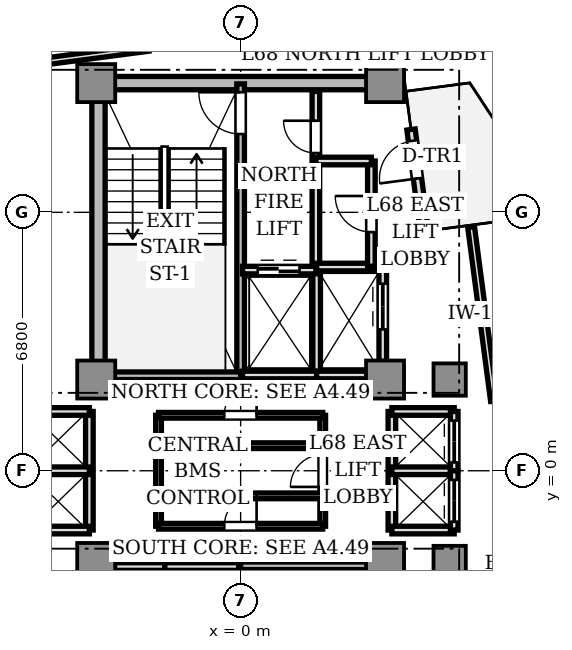
"""IFC4 building model, lengths in metres.
Left out: names, types, materials, properties, quantities, classifications, styles, units other than length and angle.
Written with IfcOpenShell. Run it as: python <this file> out.ifc"""

import sys

from ifc_helpers import new_model, si_unit, direction, frame, frame_2d, origin, origin_2d, place, context, subcontext, project, spatial, rectangle, extrude, source, transform, mapped, element, fill, save


model = new_model("IFC4")
c1 = context("Model", 3, precision=1e-05, world=origin(), true_north=direction((0.0, 1.0)))
c2 = subcontext(c1, "Body", "Model", "MODEL_VIEW")
j1 = project(units=[si_unit("LENGTHUNIT", "METRE"), si_unit("PLANEANGLEUNIT", "RADIAN")], contexts=[c1])
p1 = place(None, origin())
s1 = spatial("IfcSite", under=j1, at=p1, CompositionType="ELEMENT")
p2 = place(p1, origin())
s2 = spatial("IfcBuilding", under=s1, at=p2, CompositionType="ELEMENT")
p3 = place(p2, frame((0.0, 0.0, 244.5)))
s3 = spatial("IfcBuildingStorey", under=s2, at=p3, CompositionType="ELEMENT", Elevation=244.5)
p4 = place(p3, frame((-3.55, 10.2, 0.0), z_axis=(0.0, 0.0, 1.0), x_axis=(1.0, 0.0, 0.0)))
e1 = element("IfcWall", 1, at=p4, inside=s3, PredefinedType="SHEAR", context=c2, shape_type="SweptSolid", body=[
    extrude(rectangle(XDim=7.1, YDim=0.35, at=frame_2d((3.55, 0.0))), origin(), (0.0, 0.0, 1.0), 3.11),
])
p5 = place(p3, frame((-3.74, 2.85, 0.0), z_axis=(0.0, 0.0, 1.0), x_axis=(0.0, 1.0, 0.0)))
e2 = element("IfcWall", 2, at=p5, inside=s3, PredefinedType="SHEAR", context=c2, shape_type="SweptSolid", body=[
    extrude(rectangle(XDim=6.9, YDim=0.35, at=frame_2d((3.45, 0.0))), origin(), (0.0, 0.0, 1.0), 3.11),
])
m1 = source(origin(), c2, "Body", "SweptSolid", [
    extrude(rectangle(XDim=1.0, YDim=1.0, at=origin_2d()), origin(), (0.0, 0.0, 1.0), 3.11),
])
for number, where, z_axis, x_axis in (
    (3, (-3.8, 2.4, 0.0), (0.0, 0.0, 1.0), (1.0, 0.0, 0.0)),
    (4, (3.8, 2.4, 0.0), (0.0, 0.0, 1.0), (1.0, 0.0, 0.0)),
    (5, (-3.8, 10.2, 0.0), (0.0, 0.0, 1.0), (1.0, 0.0, 0.0)),
    (6, (3.8, 10.2, 0.0), (0.0, 0.0, 1.0), (1.0, 0.0, 0.0)),
    (7, (-3.8, -2.4, 0.0), (0.0, 0.0, 1.0), (1.0, 0.0, 0.0)),
    (8, (3.8, -2.4, 0.0), (0.0, 0.0, 1.0), (1.0, 0.0, 0.0)),
):
    element("IfcColumn", number, at=place(p3, frame(where, z_axis=z_axis, x_axis=x_axis)), inside=s3, PredefinedType="COLUMN", context=c2, shape_type="MappedRepresentation", body=[
        mapped(m1, transform((0.0, 0.0, 0.0), scale=1.0)),
    ])
m2 = source(origin(), c2, "Body", "SweptSolid", [
    extrude(rectangle(XDim=0.85, YDim=0.85, at=origin_2d()), origin(), (0.0, 0.0, 1.0), 3.11),
])
for number, where, z_axis, x_axis in (
    (9, (5.5, 2.4, 0.0), (0.0, 0.0, 1.0), (1.0, 0.0, 0.0)),
    (10, (5.5, -2.4, 0.0), (0.0, 0.0, 1.0), (1.0, 0.0, 0.0)),
):
    element("IfcColumn", number, at=place(p3, frame(where, z_axis=z_axis, x_axis=x_axis)), inside=s3, PredefinedType="COLUMN", context=c2, shape_type="MappedRepresentation", body=[
        mapped(m2, transform((0.0, 0.0, 0.0), scale=1.0)),
    ])
p6 = place(p3, frame((4.836, 6.302, 0.0), z_axis=(0.0, 0.0, 1.0), x_axis=(-0.130475563272, 0.991451525486, 0.0)))
e11 = element("IfcWall", 11, at=p6, inside=s3, PredefinedType="STANDARD", context=c2, shape_type="SweptSolid", body=[
    extrude(rectangle(XDim=2.7, YDim=0.22, at=frame_2d((1.35, 0.0))), origin(), (0.0, 0.0, 1.0), 3.11),
])
p7 = place(p6, frame((1.4, 0.0, 0.0)))
e12 = element("IfcOpeningElement", 12, at=p7, cuts=e11, PredefinedType="OPENING", context=c2, shape_type="SweptSolid", body=[
    extrude(rectangle(XDim=1.0, YDim=2.2, at=frame_2d((0.5, 1.1))), frame((0.0, 0.12, 0.0), z_axis=(0.0, -1.0, 0.0), x_axis=(1.0, 0.0, 0.0)), (0.0, 0.0, 1.0), 0.24),
])
p8 = place(p3, frame((0.0, 2.5, 0.0), z_axis=(0.0, 0.0, 1.0), x_axis=(0.0, 1.0, 0.0)))
e13 = element("IfcWall", 13, at=p8, inside=s3, PredefinedType="SOLIDWALL", context=c2, shape_type="SweptSolid", body=[
    extrude(rectangle(XDim=7.68, YDim=0.2, at=frame_2d((3.84, 0.0))), origin(), (0.0, 0.0, 1.0), 3.11),
])
p9 = place(p8, frame((6.36, 0.0, 0.0)))
e14 = element("IfcOpeningElement", 14, at=p9, cuts=e13, PredefinedType="OPENING", context=c2, shape_type="SweptSolid", body=[
    extrude(rectangle(XDim=1.1, YDim=2.15, at=frame_2d((0.55, 1.075))), frame((0.0, 0.11, 0.0), z_axis=(0.0, -1.0, 0.0), x_axis=(1.0, 0.0, 0.0)), (0.0, 0.0, 1.0), 0.22),
])
p10 = place(p3, frame((-3.72, 2.5, 0.0), z_axis=(0.0, 0.0, 1.0), x_axis=(1.0, 0.0, 0.0)))
e15 = element("IfcWall", 15, at=p10, inside=s3, PredefinedType="SOLIDWALL", context=c2, shape_type="SweptSolid", body=[
    extrude(rectangle(XDim=3.72, YDim=0.2, at=frame_2d((1.86, 0.0))), origin(), (0.0, 0.0, 1.0), 3.11),
])
p11 = place(p3, frame((0.0, -10.18, 0.0), z_axis=(0.0, 0.0, 1.0), x_axis=(0.0, 1.0, 0.0)))
e16 = element("IfcWall", 16, at=p11, inside=s3, PredefinedType="SOLIDWALL", context=c2, shape_type="SweptSolid", body=[
    extrude(rectangle(XDim=7.68, YDim=0.2, at=frame_2d((3.84, 0.0))), origin(), (0.0, 0.0, 1.0), 3.11),
])
p12 = place(p11, frame((0.28, 0.0, 0.0)))
e17 = element("IfcOpeningElement", 17, at=p12, cuts=e16, PredefinedType="OPENING", context=c2, shape_type="SweptSolid", body=[
    extrude(rectangle(XDim=1.1, YDim=2.15, at=frame_2d((0.55, 1.075))), frame((0.0, 0.11, 0.0), z_axis=(0.0, -1.0, 0.0), x_axis=(1.0, 0.0, 0.0)), (0.0, 0.0, 1.0), 0.22),
])
p13 = place(p3, frame((0.0, -2.5, 0.0), z_axis=(0.0, 0.0, 1.0), x_axis=(1.0, 0.0, 0.0)))
e18 = element("IfcWall", 18, at=p13, inside=s3, PredefinedType="SOLIDWALL", context=c2, shape_type="SweptSolid", body=[
    extrude(rectangle(XDim=3.72, YDim=0.2, at=frame_2d((1.86, 0.0))), origin(), (0.0, 0.0, 1.0), 3.11),
])
p14 = place(p3, frame((1.98, 5.32, 0.0), z_axis=(0.0, 0.0, 1.0), x_axis=(0.0, 1.0, 0.0)))
e19 = element("IfcWall", 19, at=p14, inside=s3, PredefinedType="SOLIDWALL", context=c2, shape_type="SweptSolid", body=[
    extrude(rectangle(XDim=4.66, YDim=0.2, at=frame_2d((2.33, 0.0))), origin(), (0.0, 0.0, 1.0), 2.66),
])
p15 = place(p14, frame((3.04, 0.0, 0.0)))
e20 = element("IfcOpeningElement", 20, at=p15, cuts=e19, PredefinedType="OPENING", context=c2, shape_type="SweptSolid", body=[
    extrude(rectangle(XDim=0.85, YDim=2.1, at=frame_2d((0.425, 1.05))), frame((0.0, 0.11, 0.0), z_axis=(0.0, -1.0, 0.0), x_axis=(1.0, 0.0, 0.0)), (0.0, 0.0, 1.0), 0.22),
])
p16 = place(p3, frame((2.0, 2.5, 0.0), z_axis=(0.0, 0.0, 1.0), x_axis=(0.0, 1.0, 0.0)))
e21 = element("IfcWall", 21, at=p16, inside=s3, PredefinedType="SOLIDWALL", context=c2, shape_type="SweptSolid", body=[
    extrude(rectangle(XDim=2.78, YDim=0.2, at=frame_2d((1.39, 0.0))), origin(), (0.0, 0.0, 1.0), 2.66),
])
p17 = place(p3, frame((0.05, 2.52, 0.0), z_axis=(0.0, 0.0, 1.0), x_axis=(1.0, 0.0, 0.0)))
e22 = element("IfcWall", 22, at=p17, inside=s3, PredefinedType="SOLIDWALL", context=c2, shape_type="SweptSolid", body=[
    extrude(rectangle(XDim=1.95, YDim=0.2, at=frame_2d((0.975, 0.0))), origin(), (0.0, 0.0, 1.0), 2.66),
])
p18 = place(p3, frame((0.05, 5.28, 0.0), z_axis=(0.0, 0.0, 1.0), x_axis=(1.0, 0.0, 0.0)))
e23 = element("IfcWall", 23, at=p18, inside=s3, PredefinedType="SOLIDWALL", context=c2, shape_type="SweptSolid", body=[
    extrude(rectangle(XDim=1.93, YDim=0.2, at=frame_2d((0.965, 0.0))), origin(), (0.0, 0.0, 1.0), 2.66),
])
p19 = place(p18, frame((0.4, 0.0, 0.0)))
e24 = element("IfcOpeningElement", 24, at=p19, cuts=e23, PredefinedType="OPENING", context=c2, shape_type="SweptSolid", body=[
    extrude(rectangle(XDim=1.1, YDim=2.2, at=frame_2d((0.55, 1.1))), frame((0.0, 0.11, 0.0), z_axis=(0.0, -1.0, 0.0), x_axis=(1.0, 0.0, 0.0)), (0.0, 0.0, 1.0), 0.22),
])
p20 = place(p3, frame((-2.0, -5.28, 0.0), z_axis=(0.0, 0.0, 1.0), x_axis=(0.0, 1.0, 0.0)))
e25 = element("IfcWall", 25, at=p20, inside=s3, PredefinedType="SOLIDWALL", context=c2, shape_type="SweptSolid", body=[
    extrude(rectangle(XDim=2.78, YDim=0.2, at=frame_2d((1.39, 0.0))), origin(), (0.0, 0.0, 1.0), 2.66),
])
p21 = place(p3, frame((-2.0, -2.52, 0.0), z_axis=(0.0, 0.0, 1.0), x_axis=(1.0, 0.0, 0.0)))
e26 = element("IfcWall", 26, at=p21, inside=s3, PredefinedType="SOLIDWALL", context=c2, shape_type="SweptSolid", body=[
    extrude(rectangle(XDim=1.95, YDim=0.2, at=frame_2d((0.975, 0.0))), origin(), (0.0, 0.0, 1.0), 2.66),
])
p22 = place(p3, frame((2.0, 2.52, 0.0), z_axis=(0.0, 0.0, 1.0), x_axis=(1.0, 0.0, 0.0)))
e27 = element("IfcWall", 27, at=p22, inside=s3, PredefinedType="SOLIDWALL", context=c2, shape_type="SweptSolid", body=[
    extrude(rectangle(XDim=1.32, YDim=0.2, at=frame_2d((0.66, 0.0))), origin(), (0.0, 0.0, 1.0), 2.66),
])
p23 = place(p3, frame((2.0, 5.36, 0.0), z_axis=(0.0, 0.0, 1.0), x_axis=(1.0, 0.0, 0.0)))
e28 = element("IfcWall", 28, at=p23, inside=s3, PredefinedType="SOLIDWALL", context=c2, shape_type="SweptSolid", body=[
    extrude(rectangle(XDim=1.74, YDim=0.2, at=frame_2d((0.87, 0.0))), origin(), (0.0, 0.0, 1.0), 2.66),
])
p24 = place(p3, frame((3.74, 2.88, 0.0), z_axis=(0.0, 0.0, 1.0), x_axis=(0.0, 1.0, 0.0)))
e29 = element("IfcWall", 29, at=p24, inside=s3, PredefinedType="SOLIDWALL", context=c2, shape_type="SweptSolid", body=[
    extrude(rectangle(XDim=2.48, YDim=0.2, at=frame_2d((1.24, 0.0))), origin(), (0.0, 0.0, 1.0), 2.66),
])
p25 = place(p24, frame((0.84, 0.0, 0.0)))
e30 = element("IfcOpeningElement", 30, at=p25, cuts=e29, PredefinedType="OPENING", context=c2, shape_type="SweptSolid", body=[
    extrude(rectangle(XDim=1.2, YDim=2.2, at=frame_2d((0.6, 1.1))), frame((0.0, 0.11, 0.0), z_axis=(0.0, -1.0, 0.0), x_axis=(1.0, 0.0, 0.0)), (0.0, 0.0, 1.0), 0.22),
])
p26 = place(p3, frame((-3.32, -2.52, 0.0), z_axis=(0.0, 0.0, 1.0), x_axis=(1.0, 0.0, 0.0)))
e31 = element("IfcWall", 31, at=p26, inside=s3, PredefinedType="SOLIDWALL", context=c2, shape_type="SweptSolid", body=[
    extrude(rectangle(XDim=1.32, YDim=0.2, at=frame_2d((0.66, 0.0))), origin(), (0.0, 0.0, 1.0), 2.66),
])
p27 = place(p3, frame((3.98, -1.56, 0.0), z_axis=(0.0, 0.0, 1.0), x_axis=(0.0, 1.0, 0.0)))
e32 = element("IfcWall", 32, at=p27, inside=s3, PredefinedType="SOLIDWALL", context=c2, shape_type="SweptSolid", body=[
    extrude(rectangle(XDim=3.12, YDim=0.2, at=frame_2d((1.56, 0.0))), origin(), (0.0, 0.0, 1.0), 2.33),
])
for number, where, z_axis, x_axis in (
    (33, (3.98, 1.56, 0.0), (0.0, 0.0, 1.0), (1.0, 0.0, 0.0)),
    (34, (3.98, -1.56, 0.0), (0.0, 0.0, 1.0), (1.0, 0.0, 0.0)),
    (35, (3.98, 0.0, 0.0), (0.0, 0.0, 1.0), (1.0, 0.0, 0.0)),
):
    element("IfcWall", number, at=place(p3, frame(where, z_axis=z_axis, x_axis=x_axis)), inside=s3, PredefinedType="SOLIDWALL", context=c2, shape_type="SweptSolid", body=[
        extrude(rectangle(XDim=1.64, YDim=0.2, at=frame_2d((0.82, 0.0))), origin(), (0.0, 0.0, 1.0), 2.66),
    ])
p28 = place(p3, frame((5.62, 0.0, 0.0), z_axis=(0.0, 0.0, 1.0), x_axis=(0.0, 1.0, 0.0)))
e36 = element("IfcWall", 36, at=p28, inside=s3, PredefinedType="SOLIDWALL", context=c2, shape_type="SweptSolid", body=[
    extrude(rectangle(XDim=1.56, YDim=0.2, at=frame_2d((0.78, 0.0))), origin(), (0.0, 0.0, 1.0), 2.66),
])
p29 = place(p28, frame((0.22, 0.0, 0.0)))
e37 = element("IfcOpeningElement", 37, at=p29, cuts=e36, PredefinedType="OPENING", context=c2, shape_type="SweptSolid", body=[
    extrude(rectangle(XDim=1.1, YDim=2.2, at=frame_2d((0.55, 1.1))), frame((0.0, 0.11, 0.0), z_axis=(0.0, -1.0, 0.0), x_axis=(1.0, 0.0, 0.0)), (0.0, 0.0, 1.0), 0.22),
])
p30 = place(p3, frame((5.62, -1.56, 0.0), z_axis=(0.0, 0.0, 1.0), x_axis=(0.0, 1.0, 0.0)))
e38 = element("IfcWall", 38, at=p30, inside=s3, PredefinedType="SOLIDWALL", context=c2, shape_type="SweptSolid", body=[
    extrude(rectangle(XDim=1.56, YDim=0.2, at=frame_2d((0.78, 0.0))), origin(), (0.0, 0.0, 1.0), 2.66),
])
p31 = place(p30, frame((0.22, 0.0, 0.0)))
e39 = element("IfcOpeningElement", 39, at=p31, cuts=e38, PredefinedType="OPENING", context=c2, shape_type="SweptSolid", body=[
    extrude(rectangle(XDim=1.1, YDim=2.2, at=frame_2d((0.55, 1.1))), frame((0.0, 0.11, 0.0), z_axis=(0.0, -1.0, 0.0), x_axis=(1.0, 0.0, 0.0)), (0.0, 0.0, 1.0), 0.22),
])
p32 = place(p3, frame((-3.98, -1.56, 0.0), z_axis=(0.0, 0.0, 1.0), x_axis=(0.0, 1.0, 0.0)))
e40 = element("IfcWall", 40, at=p32, inside=s3, PredefinedType="SOLIDWALL", context=c2, shape_type="SweptSolid", body=[
    extrude(rectangle(XDim=3.12, YDim=0.2, at=frame_2d((1.56, 0.0))), origin(), (0.0, 0.0, 1.0), 2.33),
])
for number, where, z_axis, x_axis in (
    (41, (-5.62, 1.56, 0.0), (0.0, 0.0, 1.0), (1.0, 0.0, 0.0)),
    (42, (-5.62, -1.56, 0.0), (0.0, 0.0, 1.0), (1.0, 0.0, 0.0)),
    (43, (-5.62, 0.0, 0.0), (0.0, 0.0, 1.0), (1.0, 0.0, 0.0)),
):
    element("IfcWall", number, at=place(p3, frame(where, z_axis=z_axis, x_axis=x_axis)), inside=s3, PredefinedType="SOLIDWALL", context=c2, shape_type="SweptSolid", body=[
        extrude(rectangle(XDim=1.64, YDim=0.2, at=frame_2d((0.82, 0.0))), origin(), (0.0, 0.0, 1.0), 2.66),
    ])
p33 = place(p3, frame((3.44, 5.38, 0.0), z_axis=(0.0, 0.0, 1.0), x_axis=(0.0, 1.0, 0.0)))
e44 = element("IfcWall", 44, at=p33, inside=s3, PredefinedType="SOLIDWALL", context=c2, shape_type="SweptSolid", body=[
    extrude(rectangle(XDim=2.77, YDim=0.2, at=frame_2d((1.385, 0.0))), origin(), (0.0, 0.0, 1.0), 2.66),
])
p34 = place(p33, frame((0.9, 0.0, 0.0)))
e45 = element("IfcOpeningElement", 45, at=p34, cuts=e44, PredefinedType="OPENING", context=c2, shape_type="SweptSolid", body=[
    extrude(rectangle(XDim=0.95, YDim=2.15, at=frame_2d((0.475, 1.075))), frame((0.0, 0.11, 0.0), z_axis=(0.0, -1.0, 0.0), x_axis=(1.0, 0.0, 0.0)), (0.0, 0.0, 1.0), 0.22),
])
p35 = place(p3, frame((1.98, 8.15, 0.0), z_axis=(0.0, 0.0, 1.0), x_axis=(1.0, 0.0, 0.0)))
e46 = element("IfcWall", 46, at=p35, inside=s3, PredefinedType="SOLIDWALL", context=c2, shape_type="SweptSolid", body=[
    extrude(rectangle(XDim=1.46, YDim=0.2, at=frame_2d((0.73, 0.0))), origin(), (0.0, 0.0, 1.0), 2.66),
])
p36 = place(p3, frame((2.16, -1.46, 0.0), z_axis=(0.0, 0.0, 1.0), x_axis=(0.0, 1.0, 0.0)))
e47 = element("IfcWall", 47, at=p36, inside=s3, PredefinedType="PARTITIONING", context=c2, shape_type="SweptSolid", body=[
    extrude(rectangle(XDim=2.92, YDim=0.15, at=frame_2d((1.46, 0.0))), origin(), (0.0, 0.0, 1.0), 2.66),
])
p37 = place(p36, frame((1.035, 0.0, 0.0)))
e48 = element("IfcOpeningElement", 48, at=p37, cuts=e47, PredefinedType="OPENING", context=c2, shape_type="SweptSolid", body=[
    extrude(rectangle(XDim=0.85, YDim=2.1, at=frame_2d((0.425, 1.05))), frame((0.0, 0.085, 0.0), z_axis=(0.0, -1.0, 0.0), x_axis=(1.0, 0.0, 0.0)), (0.0, 0.0, 1.0), 0.17),
])
p38 = place(p3, frame((-2.16, -1.46, 0.0), z_axis=(0.0, 0.0, 1.0), x_axis=(0.0, 1.0, 0.0)))
e49 = element("IfcWall", 49, at=p38, inside=s3, PredefinedType="PARTITIONING", context=c2, shape_type="SweptSolid", body=[
    extrude(rectangle(XDim=2.92, YDim=0.15, at=frame_2d((1.46, 0.0))), origin(), (0.0, 0.0, 1.0), 2.66),
])
p39 = place(p3, frame((-2.16, 1.46, 0.0), z_axis=(0.0, 0.0, 1.0), x_axis=(1.0, 0.0, 0.0)))
e50 = element("IfcWall", 50, at=p39, inside=s3, PredefinedType="PARTITIONING", context=c2, shape_type="SweptSolid", body=[
    extrude(rectangle(XDim=4.32, YDim=0.15, at=frame_2d((2.16, 0.0))), origin(), (0.0, 0.0, 1.0), 2.66),
])
p40 = place(p39, frame((1.73, 0.0, 0.0)))
e51 = element("IfcOpeningElement", 51, at=p40, cuts=e50, PredefinedType="OPENING", context=c2, shape_type="SweptSolid", body=[
    extrude(rectangle(XDim=0.85, YDim=2.1, at=frame_2d((0.425, 1.05))), frame((0.0, 0.085, 0.0), z_axis=(0.0, -1.0, 0.0), x_axis=(1.0, 0.0, 0.0)), (0.0, 0.0, 1.0), 0.17),
])
p41 = place(p3, frame((-2.16, -1.46, 0.0), z_axis=(0.0, 0.0, 1.0), x_axis=(1.0, 0.0, 0.0)))
e52 = element("IfcWall", 52, at=p41, inside=s3, PredefinedType="PARTITIONING", context=c2, shape_type="SweptSolid", body=[
    extrude(rectangle(XDim=4.32, YDim=0.15, at=frame_2d((2.16, 0.0))), origin(), (0.0, 0.0, 1.0), 2.66),
])
p42 = place(p41, frame((1.73, 0.0, 0.0)))
e53 = element("IfcOpeningElement", 53, at=p42, cuts=e52, PredefinedType="OPENING", context=c2, shape_type="SweptSolid", body=[
    extrude(rectangle(XDim=0.85, YDim=2.1, at=frame_2d((0.425, 1.05))), frame((0.0, 0.085, 0.0), z_axis=(0.0, -1.0, 0.0), x_axis=(1.0, 0.0, 0.0)), (0.0, 0.0, 1.0), 0.17),
])
for number, where, z_axis, x_axis in (
    (54, (-2.16, 0.66, 0.0), (0.0, 0.0, 1.0), (1.0, 0.0, 0.0)),
    (55, (-2.16, -0.66, 0.0), (0.0, 0.0, 1.0), (1.0, 0.0, 0.0)),
):
    element("IfcWall", number, at=place(p3, frame(where, z_axis=z_axis, x_axis=x_axis)), inside=s3, PredefinedType="PARTITIONING", context=c2, shape_type="SweptSolid", body=[
        extrude(rectangle(XDim=4.32, YDim=0.15, at=frame_2d((2.16, 0.0))), origin(), (0.0, 0.0, 1.0), 2.66),
    ])
p43 = place(p3, frame((6.667, 1.836, 0.0), z_axis=(0.0, 0.0, 1.0), x_axis=(-0.13055299465, 0.991441332398, 0.0)))
e56 = element("IfcWall", 56, at=p43, inside=s3, PredefinedType="PARTITIONING", context=c2, shape_type="SweptSolid", body=[
    extrude(rectangle(XDim=4.617, YDim=0.18, at=frame_2d((2.309, 0.0))), origin(), (0.0, 0.0, 1.0), 2.66),
])
p44 = place(p3, frame((-2.423, 11.129, 0.0), z_axis=(0.0, 0.0, 1.0), x_axis=(-0.991447274637, -0.130507860355, 0.0)))
e57 = element("IfcWall", 57, at=p44, inside=s3, PredefinedType="PARTITIONING", context=c2, shape_type="SweptSolid", body=[
    extrude(rectangle(XDim=4.617, YDim=0.18, at=frame_2d((2.309, 0.0))), origin(), (0.0, 0.0, 1.0), 2.66),
])
m3 = source(origin(), c2, "Body", "SweptSolid", [
    extrude(rectangle(XDim=1.0, YDim=0.05, at=origin_2d()), origin(), (0.0, 0.0, 1.0), 2.2),
])
p45 = place(p7, frame((0.5, 0.0, 0.0)))
e58 = element("IfcDoor", 58, at=p45, inside=s3, OperationType="SINGLE_SWING_LEFT", PredefinedType="DOOR", context=c2, shape_type="MappedRepresentation", body=[
    mapped(m3, transform((0.0, 0.0, 0.0), scale=1.0)),
])
fill(e12, e58)
m4 = source(origin(), c2, "Body", "SweptSolid", [
    extrude(rectangle(XDim=1.1, YDim=0.05, at=origin_2d()), origin(), (0.0, 0.0, 1.0), 2.15),
])
p46 = place(p9, frame((0.55, 0.0, 0.0)))
e59 = element("IfcDoor", 59, at=p46, inside=s3, OperationType="SINGLE_SWING_RIGHT", PredefinedType="DOOR", context=c2, shape_type="MappedRepresentation", body=[
    mapped(m4, transform((0.0, 0.0, 0.0), scale=1.0)),
])
fill(e14, e59)
m5 = source(origin(), c2, "Body", "SweptSolid", [
    extrude(rectangle(XDim=0.85, YDim=0.05, at=origin_2d()), origin(), (0.0, 0.0, 1.0), 2.1),
])
p47 = place(p15, frame((0.425, 0.0, 0.0)))
e60 = element("IfcDoor", 60, at=p47, inside=s3, OperationType="SINGLE_SWING_RIGHT", PredefinedType="DOOR", context=c2, shape_type="MappedRepresentation", body=[
    mapped(m5, transform((0.0, 0.0, 0.0), scale=1.0)),
])
fill(e20, e60)
m6 = source(origin(), c2, "Body", "SweptSolid", [
    extrude(rectangle(XDim=1.1, YDim=0.05, at=origin_2d()), origin(), (0.0, 0.0, 1.0), 2.2),
])
p48 = place(p19, frame((0.55, 0.0, 0.0)))
e61 = element("IfcDoor", 61, at=p48, inside=s3, OperationType="DOUBLE_DOOR_SLIDING", PredefinedType="DOOR", context=c2, shape_type="MappedRepresentation", body=[
    mapped(m6, transform((0.0, 0.0, 0.0), scale=1.0)),
])
fill(e24, e61)
m7 = source(origin(), c2, "Body", "SweptSolid", [
    extrude(rectangle(XDim=1.2, YDim=0.05, at=origin_2d()), origin(), (0.0, 0.0, 1.0), 2.2),
])
p49 = place(p25, frame((0.6, 0.0, 0.0)))
e62 = element("IfcDoor", 62, at=p49, inside=s3, OperationType="DOUBLE_DOOR_SLIDING", PredefinedType="DOOR", context=c2, shape_type="MappedRepresentation", body=[
    mapped(m7, transform((0.0, 0.0, 0.0), scale=1.0)),
])
fill(e30, e62)
p50 = place(p29, frame((0.55, 0.0, 0.0)))
e63 = element("IfcDoor", 63, at=p50, inside=s3, OperationType="DOUBLE_DOOR_SLIDING", PredefinedType="DOOR", context=c2, shape_type="MappedRepresentation", body=[
    mapped(m6, transform((0.0, 0.0, 0.0), scale=1.0)),
])
fill(e37, e63)
p51 = place(p31, frame((0.55, 0.0, 0.0)))
e64 = element("IfcDoor", 64, at=p51, inside=s3, OperationType="DOUBLE_DOOR_SLIDING", PredefinedType="DOOR", context=c2, shape_type="MappedRepresentation", body=[
    mapped(m6, transform((0.0, 0.0, 0.0), scale=1.0)),
])
fill(e39, e64)
m8 = source(origin(), c2, "Body", "SweptSolid", [
    extrude(rectangle(XDim=0.95, YDim=0.05, at=origin_2d()), origin(), (0.0, 0.0, 1.0), 2.15),
])
p52 = place(p34, frame((0.475, 0.0, 0.0)))
e65 = element("IfcDoor", 65, at=p52, inside=s3, OperationType="SINGLE_SWING_RIGHT", PredefinedType="DOOR", context=c2, shape_type="MappedRepresentation", body=[
    mapped(m8, transform((0.0, 0.0, 0.0), scale=1.0)),
])
fill(e45, e65)
p53 = place(p40, frame((0.425, 0.0, 0.0)))
e66 = element("IfcDoor", 66, at=p53, inside=s3, OperationType="SINGLE_SWING_RIGHT", PredefinedType="DOOR", context=c2, shape_type="MappedRepresentation", body=[
    mapped(m5, transform((0.0, 0.0, 0.0), scale=1.0)),
])
fill(e51, e66)
p54 = place(p37, frame((0.425, 0.0, 0.0)))
e67 = element("IfcDoor", 67, at=p54, inside=s3, OperationType="SINGLE_SWING_LEFT", PredefinedType="DOOR", context=c2, shape_type="MappedRepresentation", body=[
    mapped(m5, transform((0.0, 0.0, 0.0), scale=1.0)),
])
fill(e48, e67)
p55 = place(p42, frame((0.425, 0.0, 0.0)))
e68 = element("IfcDoor", 68, at=p55, inside=s3, OperationType="SINGLE_SWING_RIGHT", PredefinedType="DOOR", context=c2, shape_type="MappedRepresentation", body=[
    mapped(m5, transform((0.0, 0.0, 0.0), scale=1.0)),
])
fill(e53, e68)
save(model, sys.argv[1])
